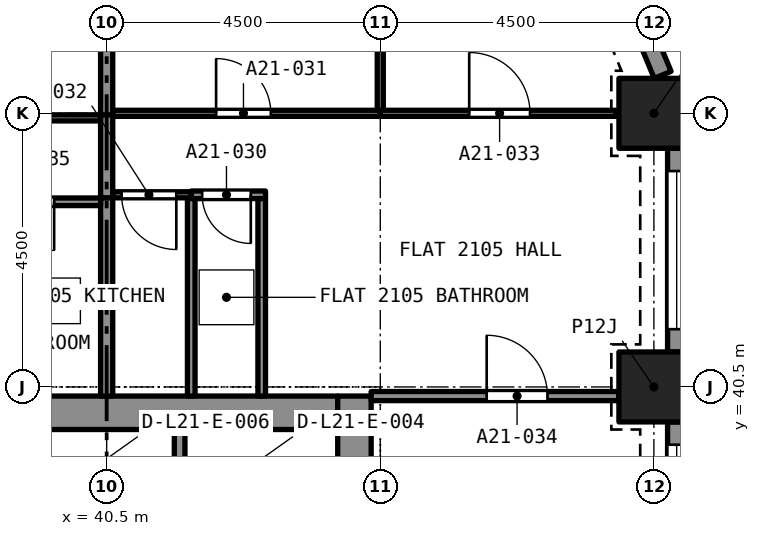
"""IFC4 building model, lengths in metres.
Left out: names, types, materials, properties, quantities, classifications, styles, units other than length and angle.
Written with IfcOpenShell. Run it as: python <this file> out.ifc"""

import sys

from ifc_helpers import new_model, si_unit, direction, frame, frame_2d, origin, origin_2d, place, context, subcontext, project, spatial, rectangle, extrude, element, fill, save


model = new_model("IFC4")
c1 = context("Model", 3, precision=1e-05, world=origin(), true_north=direction((0.0, 1.0)))
c2 = subcontext(c1, "Body", "Model", "MODEL_VIEW")
j1 = project(units=[si_unit("LENGTHUNIT", "METRE"), si_unit("PLANEANGLEUNIT", "RADIAN")], contexts=[c1])
p1 = place(None, origin())
s1 = spatial("IfcSite", under=j1, at=p1, CompositionType="ELEMENT")
p2 = place(p1, origin())
s2 = spatial("IfcBuilding", under=s1, at=p2, CompositionType="ELEMENT")
p3 = place(p2, frame((0.0, 0.0, 80.0)))
s3 = spatial("IfcBuildingStorey", under=s2, at=p3, CompositionType="ELEMENT", Elevation=80.0)
for number, where, z_axis, x_axis in (
    (1, (49.5, 40.5, 0.0), (0.0, 0.0, 1.0), (1.0, 0.0, 0.0)),
    (2, (49.5, 45.0, 0.0), (0.0, 0.0, 1.0), (1.0, 0.0, 0.0)),
):
    element("IfcColumn", number, at=place(p3, frame(where, z_axis=z_axis, x_axis=x_axis)), inside=s3, PredefinedType="COLUMN", context=c2, shape_type="SweptSolid", body=[
        extrude(rectangle(XDim=1.15, YDim=1.15, at=origin_2d()), origin(), (0.0, 0.0, 1.0), 3.2),
    ])
p4 = place(p3, frame((36.7, 40.075, 0.0), z_axis=(0.0, 0.0, 1.0), x_axis=(1.0, 0.0, 0.0)))
e3 = element("IfcWall", 3, at=p4, inside=s3, PredefinedType="SOLIDWALL", context=c2, shape_type="SweptSolid", body=[
    extrude(rectangle(XDim=7.6, YDim=0.55, at=frame_2d((3.8, 0.0))), origin(), (0.0, 0.0, 1.0), 3.2),
])
p5 = place(p3, frame((44.575, 27.15, 0.0), z_axis=(0.0, 0.0, 1.0), x_axis=(0.0, 1.0, 0.0)))
e4 = element("IfcWall", 4, at=p5, inside=s3, PredefinedType="SOLIDWALL", context=c2, shape_type="SweptSolid", body=[
    extrude(rectangle(XDim=13.2, YDim=0.55, at=frame_2d((6.6, 0.0))), origin(), (0.0, 0.0, 1.0), 3.2),
])
p6 = place(p5, frame((8.8, 0.0, 0.0)))
e5 = element("IfcOpeningElement", 5, at=p6, cuts=e4, PredefinedType="OPENING", context=c2, shape_type="SweptSolid", body=[
    extrude(rectangle(XDim=1.2, YDim=2.1, at=frame_2d((0.6, 1.05))), frame((0.0, 0.285, 0.0), z_axis=(0.0, -1.0, 0.0), x_axis=(1.0, 0.0, 0.0)), (0.0, 0.0, 1.0), 0.57),
])
p7 = place(p3, frame((49.875, 39.925, 0.0), z_axis=(0.0, 0.0, 1.0), x_axis=(0.0, -1.0, 0.0)))
e6 = element("IfcWall", 6, at=p7, inside=s3, PredefinedType="SOLIDWALL", context=c2, shape_type="SweptSolid", body=[
    extrude(rectangle(XDim=3.35, YDim=0.3, at=frame_2d((1.675, 0.0))), origin(), (0.0, 0.0, 1.0), 3.2),
])
p8 = place(p7, frame((0.375, 0.0, 0.45)))
e7 = element("IfcOpeningElement", 7, at=p8, cuts=e6, PredefinedType="OPENING", context=c2, shape_type="SweptSolid", body=[
    extrude(rectangle(XDim=2.6, YDim=1.95, at=frame_2d((1.3, 0.975))), frame((0.0, 0.16, 0.0), z_axis=(0.0, -1.0, 0.0), x_axis=(1.0, 0.0, 0.0)), (0.0, 0.0, 1.0), 0.32),
])
p9 = place(p3, frame((49.875, 44.425, 0.0), z_axis=(0.0, 0.0, 1.0), x_axis=(0.0, -1.0, 0.0)))
e8 = element("IfcWall", 8, at=p9, inside=s3, PredefinedType="SOLIDWALL", context=c2, shape_type="SweptSolid", body=[
    extrude(rectangle(XDim=3.35, YDim=0.3, at=frame_2d((1.675, 0.0))), origin(), (0.0, 0.0, 1.0), 3.2),
])
p10 = place(p9, frame((0.375, 0.0, 0.45)))
e9 = element("IfcOpeningElement", 9, at=p10, cuts=e8, PredefinedType="OPENING", context=c2, shape_type="SweptSolid", body=[
    extrude(rectangle(XDim=2.6, YDim=1.95, at=frame_2d((1.3, 0.975))), frame((0.0, 0.16, 0.0), z_axis=(0.0, -1.0, 0.0), x_axis=(1.0, 0.0, 0.0)), (0.0, 0.0, 1.0), 0.32),
])
p11 = place(p3, frame((48.816, 47.631, 0.0), z_axis=(0.0, 0.0, 1.0), x_axis=(0.382723818695, -0.923862802911, 0.0)))
e10 = element("IfcWall", 10, at=p11, inside=s3, PredefinedType="SOLIDWALL", context=c2, shape_type="SweptSolid", body=[
    extrude(rectangle(XDim=2.164, YDim=0.3, at=frame_2d((1.082, 0.0))), origin(), (0.0, 0.0, 1.0), 3.2),
])
p12 = place(p11, frame((0.271, 0.0, 0.45)))
e11 = element("IfcOpeningElement", 11, at=p12, cuts=e10, PredefinedType="OPENING", context=c2, shape_type="SweptSolid", body=[
    extrude(rectangle(XDim=1.4, YDim=1.95, at=frame_2d((0.7, 0.975))), frame((0.0, 0.16, 0.0), z_axis=(0.0, -1.0, 0.0), x_axis=(1.0, 0.0, 0.0)), (0.0, 0.0, 1.0), 0.32),
])
p13 = place(p3, frame((43.113, 43.66, 0.0), z_axis=(0.0, 0.0, 1.0), x_axis=(-1.0, 0.0, 0.0)))
e12 = element("IfcWall", 12, at=p13, inside=s3, PredefinedType="PARTITIONING", context=c2, shape_type="SweptSolid", body=[
    extrude(rectangle(XDim=1.222, YDim=0.125, at=frame_2d((0.611, 0.0))), origin(), (0.0, 0.0, 1.0), 2.9),
])
p14 = place(p13, frame((0.242, 0.0, 0.0)))
e13 = element("IfcOpeningElement", 13, at=p14, cuts=e12, PredefinedType="OPENING", context=c2, shape_type="SweptSolid", body=[
    extrude(rectangle(XDim=0.8, YDim=2.1, at=frame_2d((0.4, 1.05))), frame((0.0, 0.073, 0.0), z_axis=(0.0, -1.0, 0.0), x_axis=(1.0, 0.0, 0.0)), (0.0, 0.0, 1.0), 0.145),
])
for number, where, z_axis, x_axis in (
    (14, (43.05, 40.35, 0.0), (0.0, 0.0, 1.0), (0.0, 1.0, 0.0)),
    (15, (41.891, 40.35, 0.0), (0.0, 0.0, 1.0), (0.0, 1.0, 0.0)),
):
    element("IfcWall", number, at=place(p3, frame(where, z_axis=z_axis, x_axis=x_axis)), inside=s3, PredefinedType="PARTITIONING", context=c2, shape_type="SweptSolid", body=[
        extrude(rectangle(XDim=3.247, YDim=0.125, at=frame_2d((1.624, 0.0))), origin(), (0.0, 0.0, 1.0), 2.9),
    ])
p15 = place(p3, frame((40.6, 45.0, 0.0), z_axis=(0.0, 0.0, 1.0), x_axis=(1.0, 0.0, 0.0)))
e16 = element("IfcWall", 16, at=p15, inside=s3, PredefinedType="PARTITIONING", context=c2, shape_type="SweptSolid", body=[
    extrude(rectangle(XDim=4.4, YDim=0.1, at=frame_2d((2.2, 0.0))), origin(), (0.0, 0.0, 1.0), 2.9),
])
p16 = place(p15, frame((1.7, 0.0, 0.0)))
e17 = element("IfcOpeningElement", 17, at=p16, cuts=e16, PredefinedType="OPENING", context=c2, shape_type="SweptSolid", body=[
    extrude(rectangle(XDim=0.9, YDim=2.1, at=frame_2d((0.45, 1.05))), frame((0.0, 0.06, 0.0), z_axis=(0.0, -1.0, 0.0), x_axis=(1.0, 0.0, 0.0)), (0.0, 0.0, 1.0), 0.12),
])
p17 = place(p3, frame((45.0, 45.05, 0.0), z_axis=(0.0, 0.0, 1.0), x_axis=(0.0, 1.0, 0.0)))
e18 = element("IfcWall", 18, at=p17, inside=s3, PredefinedType="PARTITIONING", context=c2, shape_type="SweptSolid", body=[
    extrude(rectangle(XDim=3.828, YDim=0.1, at=frame_2d((1.914, 0.0))), origin(), (0.0, 0.0, 1.0), 2.9),
])
p18 = place(p3, frame((40.5, 44.95, 0.0), z_axis=(0.0, 0.0, 1.0), x_axis=(0.0, 1.0, 0.0)))
e19 = element("IfcWall", 19, at=p18, inside=s3, PredefinedType="PARTITIONING", context=c2, shape_type="SweptSolid", body=[
    extrude(rectangle(XDim=3.975, YDim=0.2, at=frame_2d((1.988, 0.0))), origin(), (0.0, 0.0, 1.0), 2.9),
])
p19 = place(p3, frame((41.891, 43.66, 0.0), z_axis=(0.0, 0.0, 1.0), x_axis=(-1.0, 0.0, 0.0)))
e20 = element("IfcWall", 20, at=p19, inside=s3, PredefinedType="PARTITIONING", context=c2, shape_type="SweptSolid", body=[
    extrude(rectangle(XDim=1.291, YDim=0.1, at=frame_2d((0.646, 0.0))), origin(), (0.0, 0.0, 1.0), 2.9),
])
p20 = place(p19, frame((0.246, 0.0, 0.0)))
e21 = element("IfcOpeningElement", 21, at=p20, cuts=e20, PredefinedType="OPENING", context=c2, shape_type="SweptSolid", body=[
    extrude(rectangle(XDim=0.9, YDim=2.1, at=frame_2d((0.45, 1.05))), frame((0.0, 0.06, 0.0), z_axis=(0.0, -1.0, 0.0), x_axis=(1.0, 0.0, 0.0)), (0.0, 0.0, 1.0), 0.12),
])
p21 = place(p3, frame((45.0, 45.0, 0.0), z_axis=(0.0, 0.0, 1.0), x_axis=(1.0, 0.0, 0.0)))
e22 = element("IfcWall", 22, at=p21, inside=s3, PredefinedType="PARTITIONING", context=c2, shape_type="SweptSolid", body=[
    extrude(rectangle(XDim=3.878, YDim=0.1, at=frame_2d((1.939, 0.0))), origin(), (0.0, 0.0, 1.0), 2.9),
])
p22 = place(p21, frame((1.462, 0.0, 0.0)))
e23 = element("IfcOpeningElement", 23, at=p22, cuts=e22, PredefinedType="OPENING", context=c2, shape_type="SweptSolid", body=[
    extrude(rectangle(XDim=1.0, YDim=2.1, at=frame_2d((0.5, 1.05))), frame((0.0, 0.06, 0.0), z_axis=(0.0, -1.0, 0.0), x_axis=(1.0, 0.0, 0.0)), (0.0, 0.0, 1.0), 0.12),
])
p23 = place(p3, frame((40.5, 43.61, 0.0), z_axis=(0.0, 0.0, 1.0), x_axis=(0.0, 1.0, 0.0)))
e24 = element("IfcWall", 24, at=p23, inside=s3, PredefinedType="PARTITIONING", context=c2, shape_type="SweptSolid", body=[
    extrude(rectangle(XDim=1.365, YDim=0.2, at=frame_2d((0.683, 0.0))), origin(), (0.0, 0.0, 1.0), 2.9),
])
p24 = place(p3, frame((44.85, 40.35, 0.0), z_axis=(0.0, 0.0, 1.0), x_axis=(1.0, 0.0, 0.0)))
e25 = element("IfcWall", 25, at=p24, inside=s3, PredefinedType="PARTITIONING", context=c2, shape_type="SweptSolid", body=[
    extrude(rectangle(XDim=4.075, YDim=0.15, at=frame_2d((2.038, 0.0))), origin(), (0.0, 0.0, 1.0), 2.9),
])
p25 = place(p24, frame((1.9, 0.0, 0.0)))
e26 = element("IfcOpeningElement", 26, at=p25, cuts=e25, PredefinedType="OPENING", context=c2, shape_type="SweptSolid", body=[
    extrude(rectangle(XDim=1.0, YDim=2.1, at=frame_2d((0.5, 1.05))), frame((0.0, 0.085, 0.0), z_axis=(0.0, -1.0, 0.0), x_axis=(1.0, 0.0, 0.0)), (0.0, 0.0, 1.0), 0.17),
])
p26 = place(p3, frame((40.5, 40.35, 0.0), z_axis=(0.0, 0.0, 1.0), x_axis=(0.0, 1.0, 0.0)))
e27 = element("IfcWall", 27, at=p26, inside=s3, PredefinedType="PARTITIONING", context=c2, shape_type="SweptSolid", body=[
    extrude(rectangle(XDim=3.257, YDim=0.2, at=frame_2d((1.629, 0.0))), origin(), (0.0, 0.0, 1.0), 2.9),
])
p27 = place(p3, frame((40.4, 43.545, 0.0), z_axis=(0.0, 0.0, 1.0), x_axis=(-1.0, 0.0, 0.0)))
e28 = element("IfcWall", 28, at=p27, inside=s3, PredefinedType="PARTITIONING", context=c2, shape_type="SweptSolid", body=[
    extrude(rectangle(XDim=2.427, YDim=0.125, at=frame_2d((1.214, 0.0))), origin(), (0.0, 0.0, 1.0), 2.9),
])
p28 = place(p27, frame((0.764, 0.0, 0.0)))
e29 = element("IfcOpeningElement", 29, at=p28, cuts=e28, PredefinedType="OPENING", context=c2, shape_type="SweptSolid", body=[
    extrude(rectangle(XDim=0.8, YDim=2.1, at=frame_2d((0.4, 1.05))), frame((0.0, 0.073, 0.0), z_axis=(0.0, -1.0, 0.0), x_axis=(1.0, 0.0, 0.0)), (0.0, 0.0, 1.0), 0.145),
])
p29 = place(p3, frame((36.0, 44.925, 0.0), z_axis=(0.0, 0.0, 1.0), x_axis=(1.0, 0.0, 0.0)))
e30 = element("IfcWall", 30, at=p29, inside=s3, PredefinedType="PARTITIONING", context=c2, shape_type="SweptSolid", body=[
    extrude(rectangle(XDim=4.4, YDim=0.1, at=frame_2d((2.2, 0.0))), origin(), (0.0, 0.0, 1.0), 2.9),
])
p30 = place(p29, frame((1.8, 0.0, 0.0)))
e31 = element("IfcOpeningElement", 31, at=p30, cuts=e30, PredefinedType="OPENING", context=c2, shape_type="SweptSolid", body=[
    extrude(rectangle(XDim=0.9, YDim=2.1, at=frame_2d((0.45, 1.05))), frame((0.0, 0.06, 0.0), z_axis=(0.0, -1.0, 0.0), x_axis=(1.0, 0.0, 0.0)), (0.0, 0.0, 1.0), 0.12),
])
p31 = place(p3, frame((41.7, 37.5, 0.0), z_axis=(0.0, 0.0, 1.0), x_axis=(0.0, 1.0, 0.0)))
e32 = element("IfcWall", 32, at=p31, inside=s3, PredefinedType="SOLIDWALL", context=c2, shape_type="SweptSolid", body=[
    extrude(rectangle(XDim=2.3, YDim=0.175, at=frame_2d((1.15, 0.0))), origin(), (0.0, 0.0, 1.0), 2.9),
])
p32 = place(p8, origin())
e33 = element("IfcWindow", 33, at=p32, inside=s3, PartitioningType="SINGLE_PANEL", PredefinedType="WINDOW", context=c2, shape_type="SweptSolid", body=[
    extrude(rectangle(XDim=2.6, YDim=1.95, at=frame_2d((1.3, 0.975))), frame((0.0, 0.03, 0.0), z_axis=(0.0, -1.0, 0.0), x_axis=(1.0, 0.0, 0.0)), (0.0, 0.0, 1.0), 0.06),
])
fill(e7, e33)
p33 = place(p10, origin())
e34 = element("IfcWindow", 34, at=p33, inside=s3, PartitioningType="SINGLE_PANEL", PredefinedType="WINDOW", context=c2, shape_type="SweptSolid", body=[
    extrude(rectangle(XDim=2.6, YDim=1.95, at=frame_2d((1.3, 0.975))), frame((0.0, 0.03, 0.0), z_axis=(0.0, -1.0, 0.0), x_axis=(1.0, 0.0, 0.0)), (0.0, 0.0, 1.0), 0.06),
])
fill(e9, e34)
p34 = place(p14, origin())
e35 = element("IfcDoor", 35, at=p34, inside=s3, OperationType="SINGLE_SWING_RIGHT", PredefinedType="DOOR", context=c2, shape_type="SweptSolid", body=[
    extrude(rectangle(XDim=0.8, YDim=2.1, at=frame_2d((0.4, 1.05))), frame((0.0, 0.025, 0.0), z_axis=(0.0, -1.0, 0.0), x_axis=(1.0, 0.0, 0.0)), (0.0, 0.0, 1.0), 0.05),
])
fill(e13, e35)
p35 = place(p16, origin())
e36 = element("IfcDoor", 36, at=p35, inside=s3, OperationType="SINGLE_SWING_LEFT", PredefinedType="DOOR", context=c2, shape_type="SweptSolid", body=[
    extrude(rectangle(XDim=0.9, YDim=2.1, at=frame_2d((0.45, 1.05))), frame((0.0, 0.025, 0.0), z_axis=(0.0, -1.0, 0.0), x_axis=(1.0, 0.0, 0.0)), (0.0, 0.0, 1.0), 0.05),
])
fill(e17, e36)
p36 = place(p20, origin())
e37 = element("IfcDoor", 37, at=p36, inside=s3, OperationType="SINGLE_SWING_RIGHT", PredefinedType="DOOR", context=c2, shape_type="SweptSolid", body=[
    extrude(rectangle(XDim=0.9, YDim=2.1, at=frame_2d((0.45, 1.05))), frame((0.0, 0.025, 0.0), z_axis=(0.0, -1.0, 0.0), x_axis=(1.0, 0.0, 0.0)), (0.0, 0.0, 1.0), 0.05),
])
fill(e21, e37)
p37 = place(p22, origin())
e38 = element("IfcDoor", 38, at=p37, inside=s3, OperationType="SINGLE_SWING_RIGHT", PredefinedType="DOOR", context=c2, shape_type="SweptSolid", body=[
    extrude(rectangle(XDim=1.0, YDim=2.1, at=frame_2d((0.5, 1.05))), frame((0.0, 0.025, 0.0), z_axis=(0.0, -1.0, 0.0), x_axis=(1.0, 0.0, 0.0)), (0.0, 0.0, 1.0), 0.05),
])
fill(e23, e38)
p38 = place(p25, origin())
e39 = element("IfcDoor", 39, at=p38, inside=s3, OperationType="SINGLE_SWING_RIGHT", PredefinedType="DOOR", context=c2, shape_type="SweptSolid", body=[
    extrude(rectangle(XDim=1.0, YDim=2.1, at=frame_2d((0.5, 1.05))), frame((0.0, 0.025, 0.0), z_axis=(0.0, -1.0, 0.0), x_axis=(1.0, 0.0, 0.0)), (0.0, 0.0, 1.0), 0.05),
])
fill(e26, e39)
p39 = place(p28, origin())
e40 = element("IfcDoor", 40, at=p39, inside=s3, OperationType="SINGLE_SWING_LEFT", PredefinedType="DOOR", context=c2, shape_type="SweptSolid", body=[
    extrude(rectangle(XDim=0.8, YDim=2.1, at=frame_2d((0.4, 1.05))), frame((0.0, 0.025, 0.0), z_axis=(0.0, -1.0, 0.0), x_axis=(1.0, 0.0, 0.0)), (0.0, 0.0, 1.0), 0.05),
])
fill(e29, e40)
save(model, sys.argv[1])
